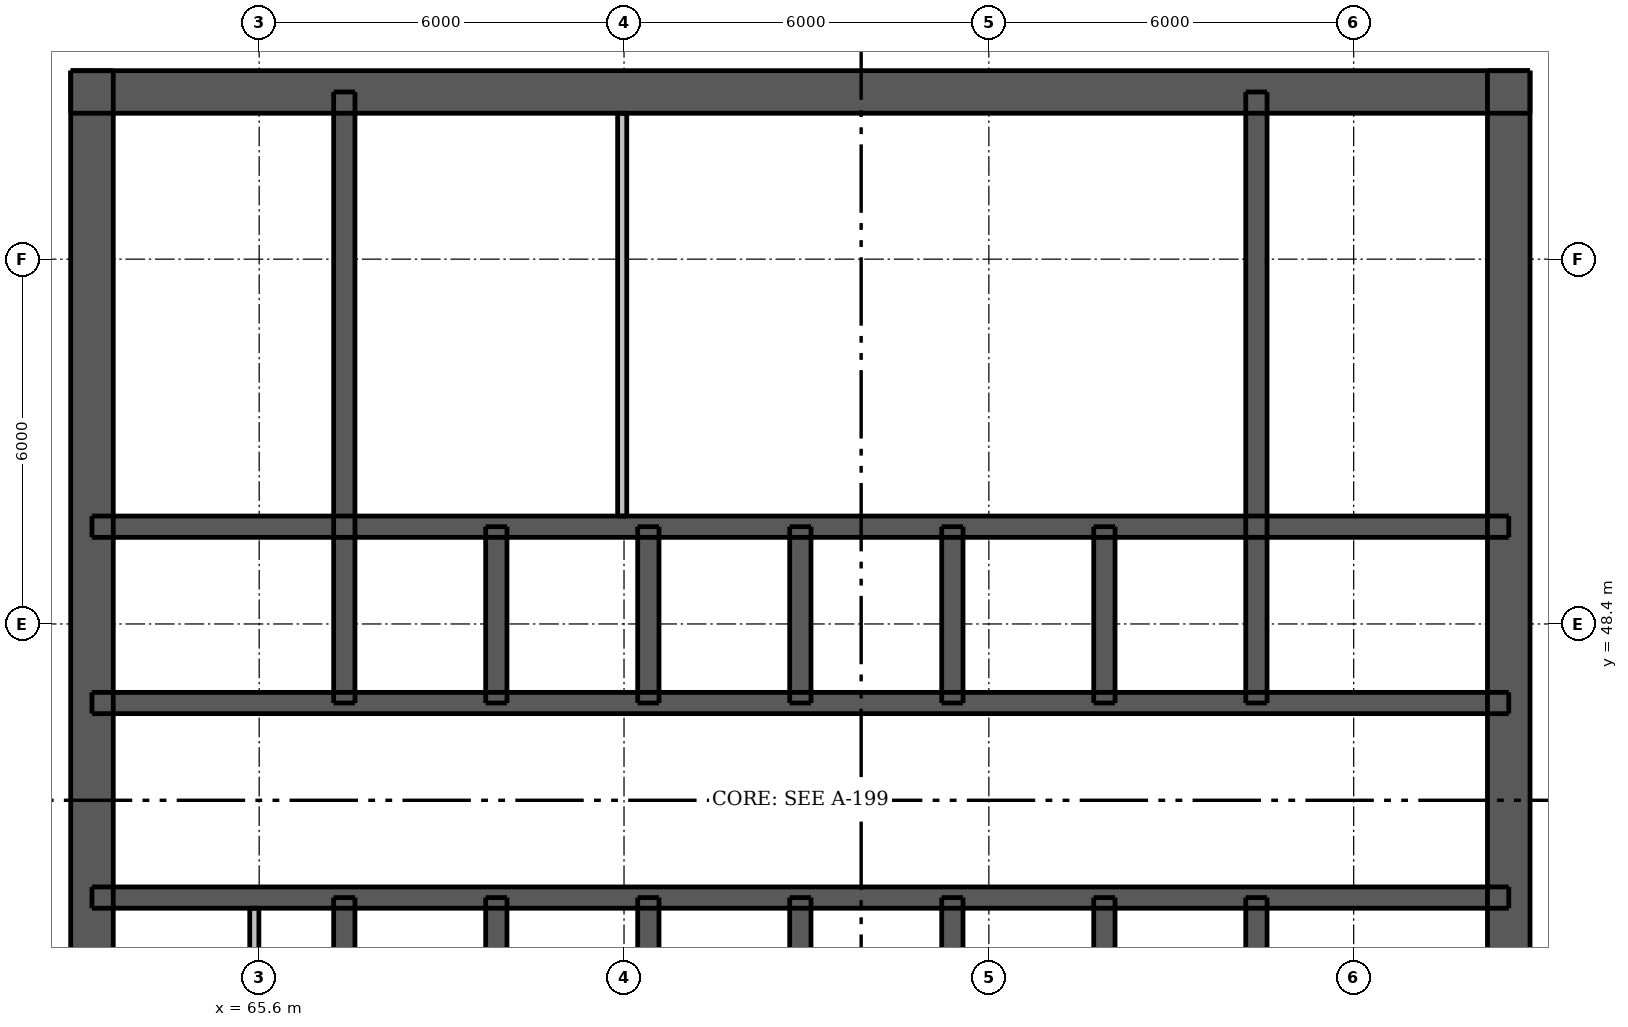
"""IFC4 building model, lengths in metres.
Left out: names, types, materials, properties, quantities, classifications, styles, units other than length and angle.
Written with IfcOpenShell. Run it as: python <this file> out.ifc"""

import sys

from ifc_helpers import new_model, si_unit, direction, frame, frame_2d, origin, place, context, subcontext, project, spatial, rectangle, extrude, element, fill, save


model = new_model("IFC4")
c1 = context("Model", 3, precision=1e-05, world=origin(), true_north=direction((0.0, 1.0)))
c2 = subcontext(c1, "Body", "Model", "MODEL_VIEW")
j1 = project(units=[si_unit("LENGTHUNIT", "METRE"), si_unit("PLANEANGLEUNIT", "RADIAN")], contexts=[c1])
p1 = place(None, origin())
s1 = spatial("IfcSite", under=j1, at=p1, CompositionType="ELEMENT")
p2 = place(p1, origin())
s2 = spatial("IfcBuilding", under=s1, at=p2, CompositionType="ELEMENT")
p3 = place(p2, frame((0.0, 0.0, 140.5)))
s3 = spatial("IfcBuildingStorey", under=s2, at=p3, CompositionType="ELEMENT", Elevation=140.5)
p4 = place(p3, frame((62.5, 57.15, 0.0), z_axis=(0.0, 0.0, 1.0), x_axis=(1.0, 0.0, 0.0)))
e1 = element("IfcWall", 1, at=p4, inside=s3, PredefinedType="SHEAR", context=c2, shape_type="SweptSolid", body=[
    extrude(rectangle(XDim=24.0, YDim=0.7, at=frame_2d((12.0, 0.0))), origin(), (0.0, 0.0, 1.0), 3.05),
])
p5 = place(p4, frame((20.938, 0.0, 0.0)))
e2 = element("IfcOpeningElement", 2, at=p5, cuts=e1, PredefinedType="OPENING", context=c2, shape_type="SweptSolid", body=[
    extrude(rectangle(XDim=1.1, YDim=2.1, at=frame_2d((0.55, 1.05))), frame((0.0, 0.36, 0.0), z_axis=(0.0, -1.0, 0.0), x_axis=(1.0, 0.0, 0.0)), (0.0, 0.0, 1.0), 0.72),
])
p6 = place(p4, frame((1.962, 0.0, 0.0)))
e3 = element("IfcOpeningElement", 3, at=p6, cuts=e1, PredefinedType="OPENING", context=c2, shape_type="SweptSolid", body=[
    extrude(rectangle(XDim=1.1, YDim=2.1, at=frame_2d((0.55, 1.05))), frame((0.0, 0.36, 0.0), z_axis=(0.0, -1.0, 0.0), x_axis=(1.0, 0.0, 0.0)), (0.0, 0.0, 1.0), 0.72),
])
p7 = place(p4, frame((6.423, 0.0, 0.0)))
e4 = element("IfcOpeningElement", 4, at=p7, cuts=e1, PredefinedType="OPENING", context=c2, shape_type="SweptSolid", body=[
    extrude(rectangle(XDim=0.9, YDim=2.1, at=frame_2d((0.45, 1.05))), frame((0.0, 0.36, 0.0), z_axis=(0.0, -1.0, 0.0), x_axis=(1.0, 0.0, 0.0)), (0.0, 0.0, 1.0), 0.72),
])
p8 = place(p4, frame((13.748, 0.0, 0.0)))
e5 = element("IfcOpeningElement", 5, at=p8, cuts=e1, PredefinedType="OPENING", context=c2, shape_type="SweptSolid", body=[
    extrude(rectangle(XDim=0.9, YDim=2.1, at=frame_2d((0.45, 1.05))), frame((0.0, 0.36, 0.0), z_axis=(0.0, -1.0, 0.0), x_axis=(1.0, 0.0, 0.0)), (0.0, 0.0, 1.0), 0.72),
])
p9 = place(p3, frame((62.85, 33.5, 0.0), z_axis=(0.0, 0.0, 1.0), x_axis=(0.0, 1.0, 0.0)))
e6 = element("IfcWall", 6, at=p9, inside=s3, PredefinedType="SHEAR", context=c2, shape_type="SweptSolid", body=[
    extrude(rectangle(XDim=24.0, YDim=0.7, at=frame_2d((12.0, 0.0))), origin(), (0.0, 0.0, 1.0), 3.05),
])
p10 = place(p9, frame((11.2, 0.0, 0.0)))
e7 = element("IfcOpeningElement", 7, at=p10, cuts=e6, PredefinedType="OPENING", context=c2, shape_type="SweptSolid", body=[
    extrude(rectangle(XDim=1.6, YDim=2.1, at=frame_2d((0.8, 1.05))), frame((0.0, 0.36, 0.0), z_axis=(0.0, -1.0, 0.0), x_axis=(1.0, 0.0, 0.0)), (0.0, 0.0, 1.0), 0.72),
])
p11 = place(p3, frame((86.15, 33.5, 0.0), z_axis=(0.0, 0.0, 1.0), x_axis=(0.0, 1.0, 0.0)))
e8 = element("IfcWall", 8, at=p11, inside=s3, PredefinedType="SHEAR", context=c2, shape_type="SweptSolid", body=[
    extrude(rectangle(XDim=24.0, YDim=0.7, at=frame_2d((12.0, 0.0))), origin(), (0.0, 0.0, 1.0), 3.05),
])
p12 = place(p11, frame((11.2, 0.0, 0.0)))
e9 = element("IfcOpeningElement", 9, at=p12, cuts=e8, PredefinedType="OPENING", context=c2, shape_type="SweptSolid", body=[
    extrude(rectangle(XDim=1.6, YDim=2.1, at=frame_2d((0.8, 1.05))), frame((0.0, 0.36, 0.0), z_axis=(0.0, -1.0, 0.0), x_axis=(1.0, 0.0, 0.0)), (0.0, 0.0, 1.0), 0.72),
])
p13 = place(p3, frame((62.85, 43.9, 0.0), z_axis=(0.0, 0.0, 1.0), x_axis=(1.0, 0.0, 0.0)))
e10 = element("IfcWall", 10, at=p13, inside=s3, PredefinedType="SHEAR", context=c2, shape_type="SweptSolid", body=[
    extrude(rectangle(XDim=23.3, YDim=0.35, at=frame_2d((11.65, 0.0))), origin(), (0.0, 0.0, 1.0), 3.05),
])
p14 = place(p13, frame((1.06, 0.0, 0.0)))
e11 = element("IfcOpeningElement", 11, at=p14, cuts=e10, PredefinedType="OPENING", context=c2, shape_type="SweptSolid", body=[
    extrude(rectangle(XDim=0.9, YDim=2.1, at=frame_2d((0.45, 1.05))), frame((0.0, 0.185, 0.0), z_axis=(0.0, -1.0, 0.0), x_axis=(1.0, 0.0, 0.0)), (0.0, 0.0, 1.0), 0.37),
])
p15 = place(p13, frame((2.923, 0.0, 0.0)))
e12 = element("IfcOpeningElement", 12, at=p15, cuts=e10, PredefinedType="OPENING", context=c2, shape_type="SweptSolid", body=[
    extrude(rectangle(XDim=0.8, YDim=2.1, at=frame_2d((0.4, 1.05))), frame((0.0, 0.185, 0.0), z_axis=(0.0, -1.0, 0.0), x_axis=(1.0, 0.0, 0.0)), (0.0, 0.0, 1.0), 0.37),
])
p16 = place(p13, frame((20.688, 0.0, 0.0)))
e13 = element("IfcOpeningElement", 13, at=p16, cuts=e10, PredefinedType="OPENING", context=c2, shape_type="SweptSolid", body=[
    extrude(rectangle(XDim=0.9, YDim=2.1, at=frame_2d((0.45, 1.05))), frame((0.0, 0.185, 0.0), z_axis=(0.0, -1.0, 0.0), x_axis=(1.0, 0.0, 0.0)), (0.0, 0.0, 1.0), 0.37),
])
p17 = place(p13, frame((4.85, 0.0, 0.0)))
e14 = element("IfcOpeningElement", 14, at=p17, cuts=e10, PredefinedType="OPENING", context=c2, shape_type="SweptSolid", body=[
    extrude(rectangle(XDim=1.1, YDim=2.1, at=frame_2d((0.55, 1.05))), frame((0.0, 0.185, 0.0), z_axis=(0.0, -1.0, 0.0), x_axis=(1.0, 0.0, 0.0)), (0.0, 0.0, 1.0), 0.37),
])
p18 = place(p13, frame((7.35, 0.0, 0.0)))
e15 = element("IfcOpeningElement", 15, at=p18, cuts=e10, PredefinedType="OPENING", context=c2, shape_type="SweptSolid", body=[
    extrude(rectangle(XDim=1.1, YDim=2.1, at=frame_2d((0.55, 1.05))), frame((0.0, 0.185, 0.0), z_axis=(0.0, -1.0, 0.0), x_axis=(1.0, 0.0, 0.0)), (0.0, 0.0, 1.0), 0.37),
])
p19 = place(p13, frame((9.85, 0.0, 0.0)))
e16 = element("IfcOpeningElement", 16, at=p19, cuts=e10, PredefinedType="OPENING", context=c2, shape_type="SweptSolid", body=[
    extrude(rectangle(XDim=1.1, YDim=2.1, at=frame_2d((0.55, 1.05))), frame((0.0, 0.185, 0.0), z_axis=(0.0, -1.0, 0.0), x_axis=(1.0, 0.0, 0.0)), (0.0, 0.0, 1.0), 0.37),
])
p20 = place(p13, frame((12.35, 0.0, 0.0)))
e17 = element("IfcOpeningElement", 17, at=p20, cuts=e10, PredefinedType="OPENING", context=c2, shape_type="SweptSolid", body=[
    extrude(rectangle(XDim=1.1, YDim=2.1, at=frame_2d((0.55, 1.05))), frame((0.0, 0.185, 0.0), z_axis=(0.0, -1.0, 0.0), x_axis=(1.0, 0.0, 0.0)), (0.0, 0.0, 1.0), 0.37),
])
p21 = place(p13, frame((14.85, 0.0, 0.0)))
e18 = element("IfcOpeningElement", 18, at=p21, cuts=e10, PredefinedType="OPENING", context=c2, shape_type="SweptSolid", body=[
    extrude(rectangle(XDim=1.1, YDim=2.1, at=frame_2d((0.55, 1.05))), frame((0.0, 0.185, 0.0), z_axis=(0.0, -1.0, 0.0), x_axis=(1.0, 0.0, 0.0)), (0.0, 0.0, 1.0), 0.37),
])
p22 = place(p13, frame((17.35, 0.0, 0.0)))
e19 = element("IfcOpeningElement", 19, at=p22, cuts=e10, PredefinedType="OPENING", context=c2, shape_type="SweptSolid", body=[
    extrude(rectangle(XDim=1.1, YDim=2.1, at=frame_2d((0.55, 1.05))), frame((0.0, 0.185, 0.0), z_axis=(0.0, -1.0, 0.0), x_axis=(1.0, 0.0, 0.0)), (0.0, 0.0, 1.0), 0.37),
])
p23 = place(p3, frame((62.85, 47.1, 0.0), z_axis=(0.0, 0.0, 1.0), x_axis=(1.0, 0.0, 0.0)))
e20 = element("IfcWall", 20, at=p23, inside=s3, PredefinedType="SHEAR", context=c2, shape_type="SweptSolid", body=[
    extrude(rectangle(XDim=23.3, YDim=0.35, at=frame_2d((11.65, 0.0))), origin(), (0.0, 0.0, 1.0), 3.05),
])
p24 = place(p23, frame((1.712, 0.0, 0.0)))
e21 = element("IfcOpeningElement", 21, at=p24, cuts=e20, PredefinedType="OPENING", context=c2, shape_type="SweptSolid", body=[
    extrude(rectangle(XDim=0.9, YDim=2.1, at=frame_2d((0.45, 1.05))), frame((0.0, 0.185, 0.0), z_axis=(0.0, -1.0, 0.0), x_axis=(1.0, 0.0, 0.0)), (0.0, 0.0, 1.0), 0.37),
])
p25 = place(p23, frame((20.688, 0.0, 0.0)))
e22 = element("IfcOpeningElement", 22, at=p25, cuts=e20, PredefinedType="OPENING", context=c2, shape_type="SweptSolid", body=[
    extrude(rectangle(XDim=0.9, YDim=2.1, at=frame_2d((0.45, 1.05))), frame((0.0, 0.185, 0.0), z_axis=(0.0, -1.0, 0.0), x_axis=(1.0, 0.0, 0.0)), (0.0, 0.0, 1.0), 0.37),
])
p26 = place(p3, frame((62.85, 50.0, 0.0), z_axis=(0.0, 0.0, 1.0), x_axis=(1.0, 0.0, 0.0)))
e23 = element("IfcWall", 23, at=p26, inside=s3, PredefinedType="SHEAR", context=c2, shape_type="SweptSolid", body=[
    extrude(rectangle(XDim=23.3, YDim=0.35, at=frame_2d((11.65, 0.0))), origin(), (0.0, 0.0, 1.0), 3.05),
])
p27 = place(p3, frame((67.0, 33.85, 0.0), z_axis=(0.0, 0.0, 1.0), x_axis=(0.0, 1.0, 0.0)))
e24 = element("IfcWall", 24, at=p27, inside=s3, PredefinedType="SHEAR", context=c2, shape_type="SweptSolid", body=[
    extrude(rectangle(XDim=10.05, YDim=0.35, at=frame_2d((5.025, 0.0))), origin(), (0.0, 0.0, 1.0), 3.05),
])
p28 = place(p27, frame((0.55, 0.0, 0.0)))
e25 = element("IfcOpeningElement", 25, at=p28, cuts=e24, PredefinedType="OPENING", context=c2, shape_type="SweptSolid", body=[
    extrude(rectangle(XDim=1.1, YDim=2.1, at=frame_2d((0.55, 1.05))), frame((0.0, 0.185, 0.0), z_axis=(0.0, -1.0, 0.0), x_axis=(1.0, 0.0, 0.0)), (0.0, 0.0, 1.0), 0.37),
])
for number, where, z_axis, x_axis in (
    (26, (67.0, 47.1, 0.0), (0.0, 0.0, 1.0), (0.0, 1.0, 0.0)),
    (27, (82.0, 33.85, 0.0), (0.0, 0.0, 1.0), (0.0, 1.0, 0.0)),
    (28, (82.0, 47.1, 0.0), (0.0, 0.0, 1.0), (0.0, 1.0, 0.0)),
):
    element("IfcWall", number, at=place(p3, frame(where, z_axis=z_axis, x_axis=x_axis)), inside=s3, PredefinedType="SHEAR", context=c2, shape_type="SweptSolid", body=[
        extrude(rectangle(XDim=10.05, YDim=0.35, at=frame_2d((5.025, 0.0))), origin(), (0.0, 0.0, 1.0), 3.05),
    ])
for number, where, z_axis, x_axis in (
    (29, (69.5, 41.0, 0.0), (0.0, 0.0, 1.0), (0.0, 1.0, 0.0)),
    (30, (69.5, 47.1, 0.0), (0.0, 0.0, 1.0), (0.0, 1.0, 0.0)),
    (31, (72.0, 41.0, 0.0), (0.0, 0.0, 1.0), (0.0, 1.0, 0.0)),
    (32, (72.0, 47.1, 0.0), (0.0, 0.0, 1.0), (0.0, 1.0, 0.0)),
    (33, (74.5, 41.0, 0.0), (0.0, 0.0, 1.0), (0.0, 1.0, 0.0)),
    (34, (74.5, 47.1, 0.0), (0.0, 0.0, 1.0), (0.0, 1.0, 0.0)),
    (35, (77.0, 41.0, 0.0), (0.0, 0.0, 1.0), (0.0, 1.0, 0.0)),
    (36, (77.0, 47.1, 0.0), (0.0, 0.0, 1.0), (0.0, 1.0, 0.0)),
    (37, (79.5, 41.0, 0.0), (0.0, 0.0, 1.0), (0.0, 1.0, 0.0)),
    (38, (79.5, 47.1, 0.0), (0.0, 0.0, 1.0), (0.0, 1.0, 0.0)),
):
    element("IfcWall", number, at=place(p3, frame(where, z_axis=z_axis, x_axis=x_axis)), inside=s3, PredefinedType="SHEAR", context=c2, shape_type="SweptSolid", body=[
        extrude(rectangle(XDim=2.9, YDim=0.35, at=frame_2d((1.45, 0.0))), origin(), (0.0, 0.0, 1.0), 3.05),
    ])
p29 = place(p3, frame((65.52, 41.175, 0.0), z_axis=(0.0, 0.0, 1.0), x_axis=(0.0, 1.0, 0.0)))
e39 = element("IfcWall", 39, at=p29, inside=s3, PredefinedType="PLUMBINGWALL", context=c2, shape_type="SweptSolid", body=[
    extrude(rectangle(XDim=2.55, YDim=0.15, at=frame_2d((1.275, 0.0))), origin(), (0.0, 0.0, 1.0), 3.05),
])
p30 = place(p3, frame((71.57, 50.175, 0.0), z_axis=(0.0, 0.0, 1.0), x_axis=(0.0, 1.0, 0.0)))
e40 = element("IfcWall", 40, at=p30, inside=s3, PredefinedType="PLUMBINGWALL", context=c2, shape_type="SweptSolid", body=[
    extrude(rectangle(XDim=6.625, YDim=0.15, at=frame_2d((3.312, 0.0))), origin(), (0.0, 0.0, 1.0), 3.05),
])
p31 = place(p5, origin())
e41 = element("IfcDoor", 41, at=p31, inside=s3, OperationType="SINGLE_SWING_RIGHT", PredefinedType="DOOR", context=c2, shape_type="SweptSolid", body=[
    extrude(rectangle(XDim=1.1, YDim=2.1, at=frame_2d((0.55, 1.05))), frame((0.0, -0.288, 0.0), z_axis=(0.0, -1.0, 0.0), x_axis=(1.0, 0.0, 0.0)), (0.0, 0.0, 1.0), 0.05),
])
fill(e2, e41)
p32 = place(p6, origin())
e42 = element("IfcDoor", 42, at=p32, inside=s3, OperationType="SINGLE_SWING_LEFT", PredefinedType="DOOR", context=c2, shape_type="SweptSolid", body=[
    extrude(rectangle(XDim=1.1, YDim=2.1, at=frame_2d((0.55, 1.05))), frame((0.0, -0.288, 0.0), z_axis=(0.0, -1.0, 0.0), x_axis=(1.0, 0.0, 0.0)), (0.0, 0.0, 1.0), 0.05),
])
fill(e3, e42)
p33 = place(p10, origin())
e43 = element("IfcDoor", 43, at=p33, inside=s3, OperationType="DOUBLE_DOOR_SINGLE_SWING", PredefinedType="DOOR", context=c2, shape_type="SweptSolid", body=[
    extrude(rectangle(XDim=1.6, YDim=2.1, at=frame_2d((0.8, 1.05))), frame((0.0, -0.288, 0.0), z_axis=(0.0, -1.0, 0.0), x_axis=(1.0, 0.0, 0.0)), (0.0, 0.0, 1.0), 0.05),
])
fill(e7, e43)
p34 = place(p12, origin())
e44 = element("IfcDoor", 44, at=p34, inside=s3, OperationType="DOUBLE_DOOR_SINGLE_SWING", PredefinedType="DOOR", context=c2, shape_type="SweptSolid", body=[
    extrude(rectangle(XDim=1.6, YDim=2.1, at=frame_2d((0.8, 1.05))), frame((0.0, 0.337, 0.0), z_axis=(0.0, -1.0, 0.0), x_axis=(1.0, 0.0, 0.0)), (0.0, 0.0, 1.0), 0.05),
])
fill(e9, e44)
p35 = place(p14, origin())
e45 = element("IfcDoor", 45, at=p35, inside=s3, OperationType="SINGLE_SWING_LEFT", PredefinedType="DOOR", context=c2, shape_type="SweptSolid", body=[
    extrude(rectangle(XDim=0.9, YDim=2.1, at=frame_2d((0.45, 1.05))), frame((0.0, -0.112, 0.0), z_axis=(0.0, -1.0, 0.0), x_axis=(1.0, 0.0, 0.0)), (0.0, 0.0, 1.0), 0.05),
])
fill(e11, e45)
p36 = place(p15, origin())
e46 = element("IfcDoor", 46, at=p36, inside=s3, OperationType="SINGLE_SWING_RIGHT", PredefinedType="DOOR", context=c2, shape_type="SweptSolid", body=[
    extrude(rectangle(XDim=0.8, YDim=2.1, at=frame_2d((0.4, 1.05))), frame((0.0, -0.112, 0.0), z_axis=(0.0, -1.0, 0.0), x_axis=(1.0, 0.0, 0.0)), (0.0, 0.0, 1.0), 0.05),
])
fill(e12, e46)
p37 = place(p16, origin())
e47 = element("IfcDoor", 47, at=p37, inside=s3, OperationType="SINGLE_SWING_LEFT", PredefinedType="DOOR", context=c2, shape_type="SweptSolid", body=[
    extrude(rectangle(XDim=0.9, YDim=2.1, at=frame_2d((0.45, 1.05))), frame((0.0, -0.112, 0.0), z_axis=(0.0, -1.0, 0.0), x_axis=(1.0, 0.0, 0.0)), (0.0, 0.0, 1.0), 0.05),
])
fill(e13, e47)
p38 = place(p24, origin())
e48 = element("IfcDoor", 48, at=p38, inside=s3, OperationType="SINGLE_SWING_LEFT", PredefinedType="DOOR", context=c2, shape_type="SweptSolid", body=[
    extrude(rectangle(XDim=0.9, YDim=2.1, at=frame_2d((0.45, 1.05))), frame((0.0, 0.163, 0.0), z_axis=(0.0, -1.0, 0.0), x_axis=(1.0, 0.0, 0.0)), (0.0, 0.0, 1.0), 0.05),
])
fill(e21, e48)
p39 = place(p25, origin())
e49 = element("IfcDoor", 49, at=p39, inside=s3, OperationType="SINGLE_SWING_LEFT", PredefinedType="DOOR", context=c2, shape_type="SweptSolid", body=[
    extrude(rectangle(XDim=0.9, YDim=2.1, at=frame_2d((0.45, 1.05))), frame((0.0, 0.163, 0.0), z_axis=(0.0, -1.0, 0.0), x_axis=(1.0, 0.0, 0.0)), (0.0, 0.0, 1.0), 0.05),
])
fill(e22, e49)
p40 = place(p7, origin())
e50 = element("IfcDoor", 50, at=p40, inside=s3, OperationType="SINGLE_SWING_RIGHT", PredefinedType="DOOR", context=c2, shape_type="SweptSolid", body=[
    extrude(rectangle(XDim=0.9, YDim=2.1, at=frame_2d((0.45, 1.05))), frame((0.0, -0.288, 0.0), z_axis=(0.0, -1.0, 0.0), x_axis=(1.0, 0.0, 0.0)), (0.0, 0.0, 1.0), 0.05),
])
fill(e4, e50)
p41 = place(p8, origin())
e51 = element("IfcDoor", 51, at=p41, inside=s3, OperationType="SINGLE_SWING_RIGHT", PredefinedType="DOOR", context=c2, shape_type="SweptSolid", body=[
    extrude(rectangle(XDim=0.9, YDim=2.1, at=frame_2d((0.45, 1.05))), frame((0.0, -0.288, 0.0), z_axis=(0.0, -1.0, 0.0), x_axis=(1.0, 0.0, 0.0)), (0.0, 0.0, 1.0), 0.05),
])
fill(e5, e51)
p42 = place(p17, origin())
e52 = element("IfcDoor", 52, at=p42, inside=s3, OperationType="DOUBLE_DOOR_SLIDING", PredefinedType="DOOR", context=c2, shape_type="SweptSolid", body=[
    extrude(rectangle(XDim=1.1, YDim=2.1, at=frame_2d((0.55, 1.05))), frame((0.0, 0.025, 0.0), z_axis=(0.0, -1.0, 0.0), x_axis=(1.0, 0.0, 0.0)), (0.0, 0.0, 1.0), 0.05),
])
fill(e14, e52)
p43 = place(p18, origin())
e53 = element("IfcDoor", 53, at=p43, inside=s3, OperationType="DOUBLE_DOOR_SLIDING", PredefinedType="DOOR", context=c2, shape_type="SweptSolid", body=[
    extrude(rectangle(XDim=1.1, YDim=2.1, at=frame_2d((0.55, 1.05))), frame((0.0, 0.025, 0.0), z_axis=(0.0, -1.0, 0.0), x_axis=(1.0, 0.0, 0.0)), (0.0, 0.0, 1.0), 0.05),
])
fill(e15, e53)
p44 = place(p19, origin())
e54 = element("IfcDoor", 54, at=p44, inside=s3, OperationType="DOUBLE_DOOR_SLIDING", PredefinedType="DOOR", context=c2, shape_type="SweptSolid", body=[
    extrude(rectangle(XDim=1.1, YDim=2.1, at=frame_2d((0.55, 1.05))), frame((0.0, 0.025, 0.0), z_axis=(0.0, -1.0, 0.0), x_axis=(1.0, 0.0, 0.0)), (0.0, 0.0, 1.0), 0.05),
])
fill(e16, e54)
p45 = place(p20, origin())
e55 = element("IfcDoor", 55, at=p45, inside=s3, OperationType="DOUBLE_DOOR_SLIDING", PredefinedType="DOOR", context=c2, shape_type="SweptSolid", body=[
    extrude(rectangle(XDim=1.1, YDim=2.1, at=frame_2d((0.55, 1.05))), frame((0.0, 0.025, 0.0), z_axis=(0.0, -1.0, 0.0), x_axis=(1.0, 0.0, 0.0)), (0.0, 0.0, 1.0), 0.05),
])
fill(e17, e55)
p46 = place(p21, origin())
e56 = element("IfcDoor", 56, at=p46, inside=s3, OperationType="DOUBLE_DOOR_SLIDING", PredefinedType="DOOR", context=c2, shape_type="SweptSolid", body=[
    extrude(rectangle(XDim=1.1, YDim=2.1, at=frame_2d((0.55, 1.05))), frame((0.0, 0.025, 0.0), z_axis=(0.0, -1.0, 0.0), x_axis=(1.0, 0.0, 0.0)), (0.0, 0.0, 1.0), 0.05),
])
fill(e18, e56)
p47 = place(p22, origin())
e57 = element("IfcDoor", 57, at=p47, inside=s3, OperationType="DOUBLE_DOOR_SLIDING", PredefinedType="DOOR", context=c2, shape_type="SweptSolid", body=[
    extrude(rectangle(XDim=1.1, YDim=2.1, at=frame_2d((0.55, 1.05))), frame((0.0, 0.025, 0.0), z_axis=(0.0, -1.0, 0.0), x_axis=(1.0, 0.0, 0.0)), (0.0, 0.0, 1.0), 0.05),
])
fill(e19, e57)
save(model, sys.argv[1])
